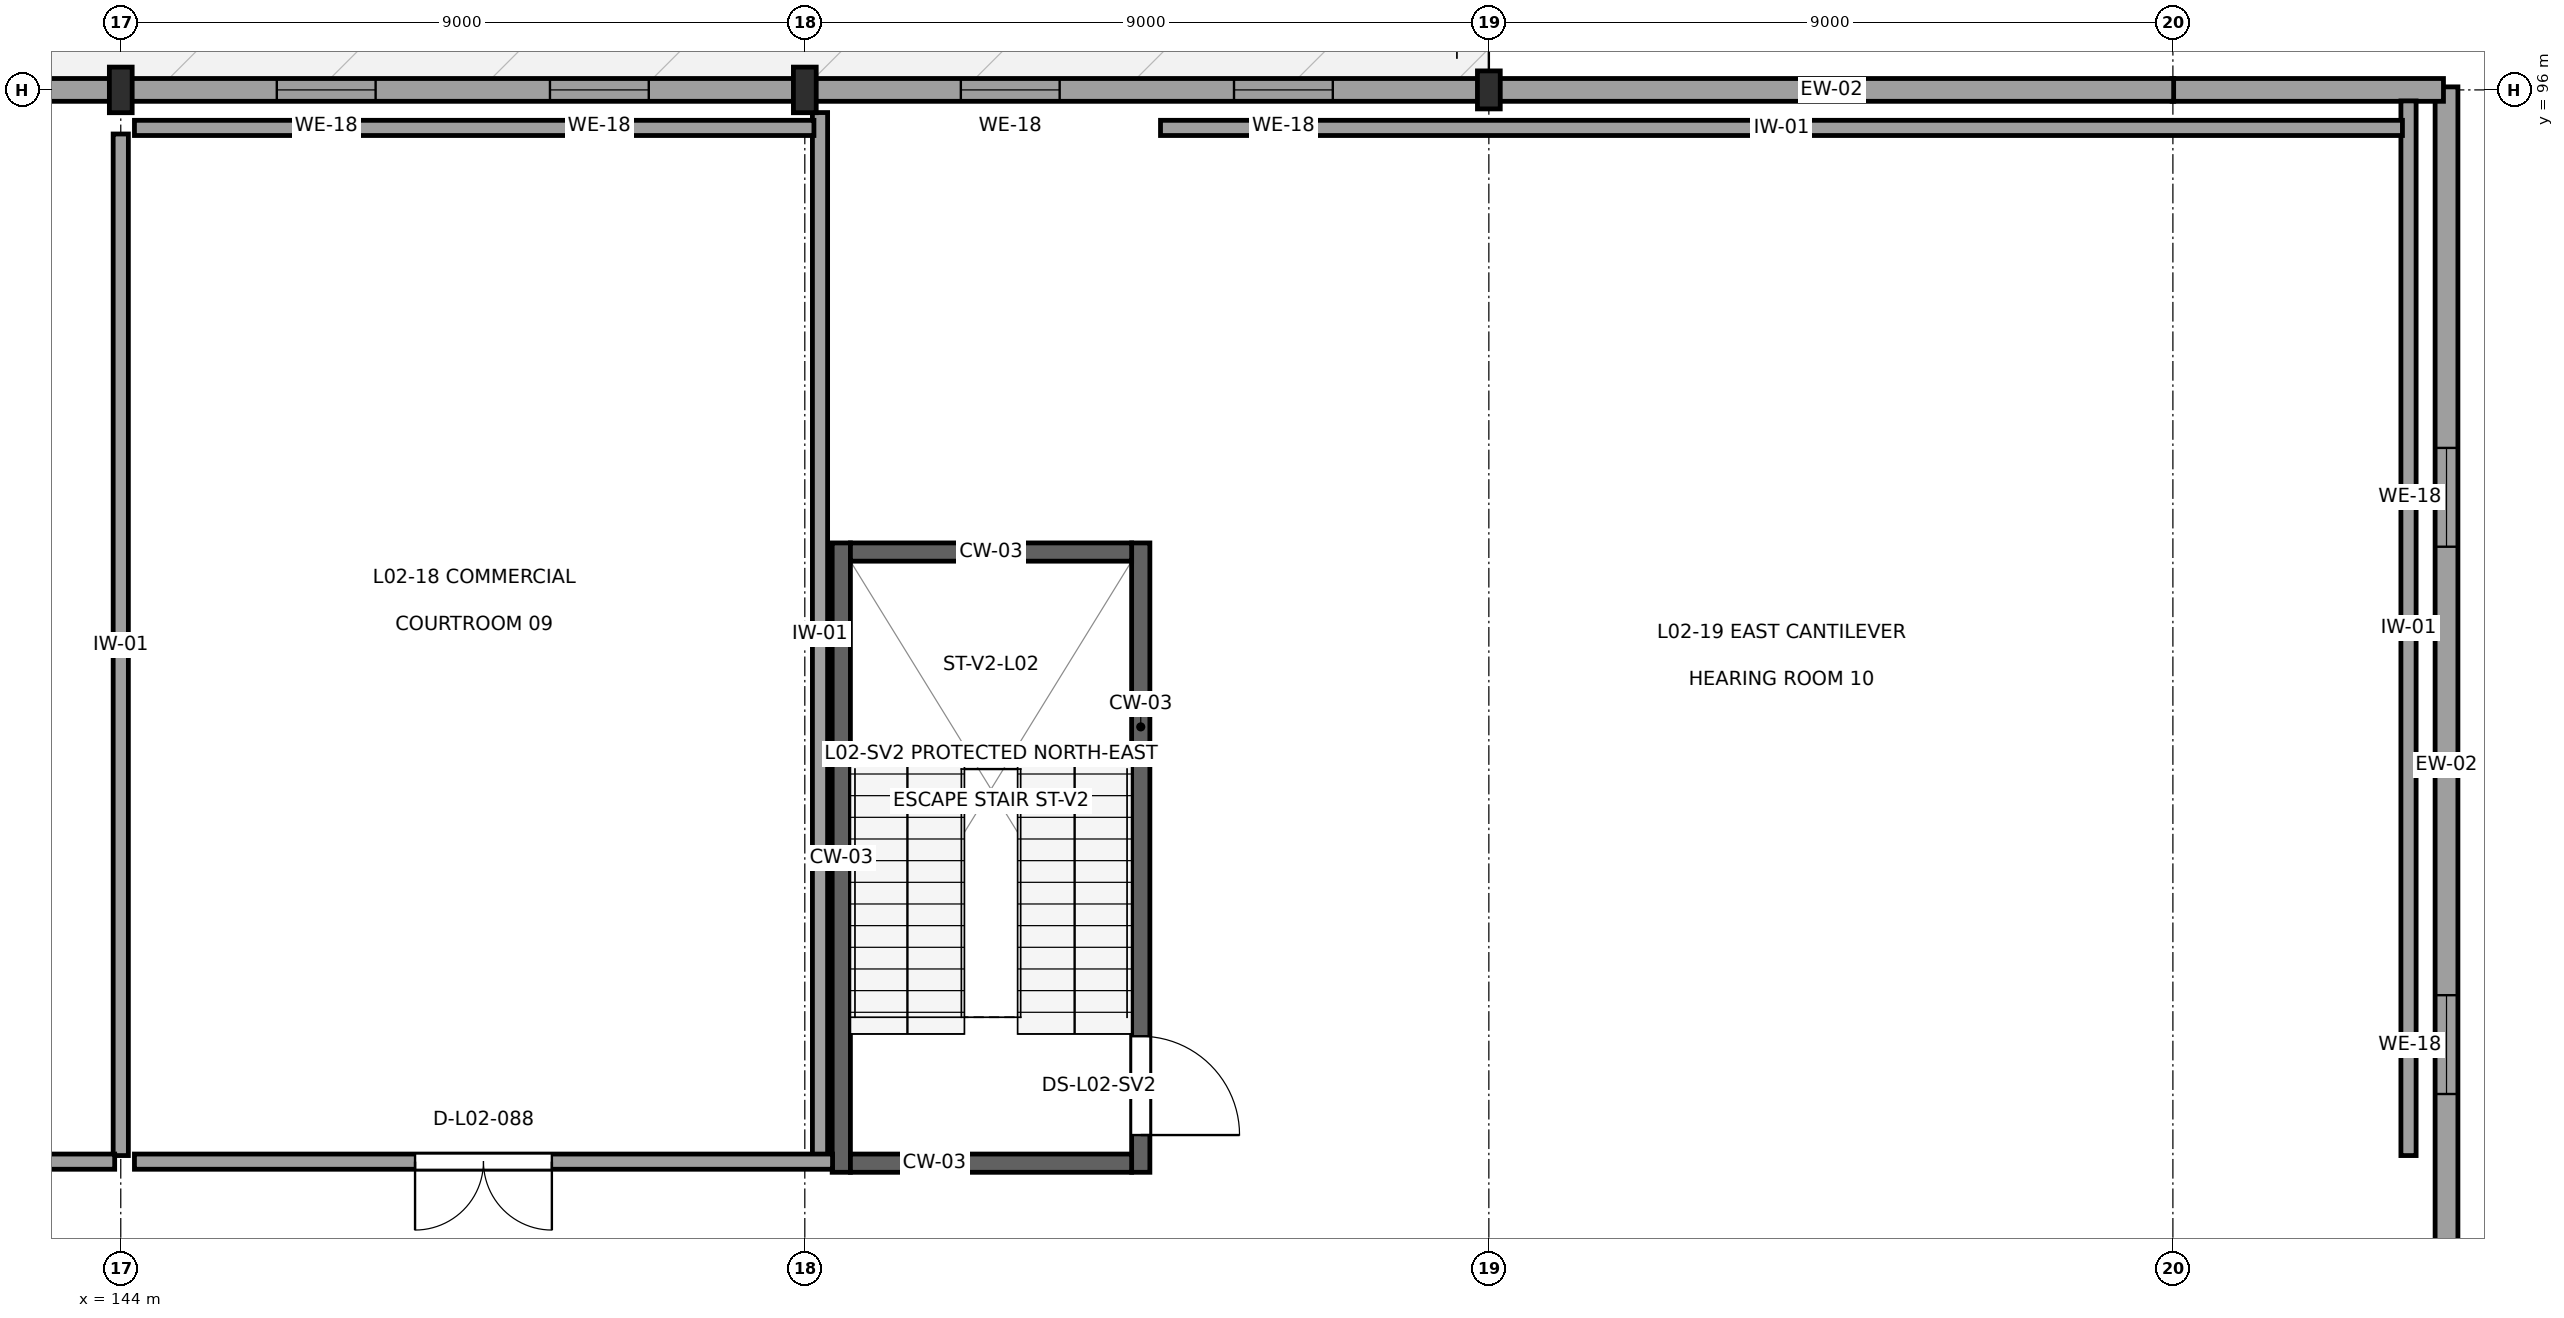
"""IFC4 building model, lengths in metres.
Left out: names, types, materials, properties, quantities, classifications, styles, units other than length and angle.
Written with IfcOpenShell. Run it as: python <this file> out.ifc"""

import sys

from ifc_helpers import new_model, si_unit, direction, frame, frame_2d, origin, origin_2d, place, context, subcontext, project, spatial, rectangle, i_section, extrude, element, fill, save


model = new_model("IFC4")
c1 = context("Model", 3, precision=1e-05, world=origin(), true_north=direction((0.0, 1.0)))
c2 = subcontext(c1, "Body", "Model", "MODEL_VIEW")
j1 = project(units=[si_unit("LENGTHUNIT", "METRE"), si_unit("PLANEANGLEUNIT", "RADIAN")], contexts=[c1])
p1 = place(None, origin())
s1 = spatial("IfcSite", under=j1, at=p1, CompositionType="ELEMENT")
p2 = place(p1, origin())
s2 = spatial("IfcBuilding", under=s1, at=p2, CompositionType="ELEMENT")
p3 = place(p2, frame((0.0, 0.0, 9.9)))
s3 = spatial("IfcBuildingStorey", under=s2, at=p3, CompositionType="ELEMENT", Elevation=9.9)
for number, where, z_axis, x_axis in (
    (1, (144.0, 96.0, 0.0), (0.0, 0.0, 1.0), (1.0, 0.0, 0.0)),
    (2, (153.0, 96.0, 0.0), (0.0, 0.0, 1.0), (1.0, 0.0, 0.0)),
):
    element("IfcColumn", number, at=place(p3, frame(where, z_axis=z_axis, x_axis=x_axis)), inside=s3, PredefinedType="COLUMN", context=c2, shape_type="SweptSolid", body=[
        extrude(i_section(OverallWidth=0.3, OverallDepth=0.6, WebThickness=0.015, FlangeThickness=0.03, at=origin_2d()), origin(), (0.0, 0.0, 1.0), 4.5),
    ])
p4 = place(p3, frame((162.0, 96.0, 0.0), z_axis=(0.0, 0.0, 1.0), x_axis=(1.0, 0.0, 0.0)))
e3 = element("IfcColumn", 3, at=p4, inside=s3, PredefinedType="COLUMN", context=c2, shape_type="SweptSolid", body=[
    extrude(i_section(OverallWidth=0.3, OverallDepth=0.5, WebThickness=0.014, FlangeThickness=0.028, at=origin_2d()), origin(), (0.0, 0.0, 1.0), 4.5),
])
p5 = place(p3, frame((174.6, 78.04, 0.0), z_axis=(0.0, 0.0, 1.0), x_axis=(0.0, 1.0, 0.0)))
e4 = element("IfcWall", 4, at=p5, inside=s3, PredefinedType="SOLIDWALL", context=c2, shape_type="SweptSolid", body=[
    extrude(rectangle(XDim=18.0, YDim=0.3, at=frame_2d((9.0, 0.0))), origin(), (0.0, 0.0, 1.0), 3.545),
])
p6 = place(p5, frame((4.75, 0.0, 0.9)))
e5 = element("IfcOpeningElement", 5, at=p6, cuts=e4, PredefinedType="OPENING", context=c2, shape_type="SweptSolid", body=[
    extrude(rectangle(XDim=1.3, YDim=1.3, at=frame_2d((0.65, 0.65))), frame((0.0, 0.165, 0.0), z_axis=(0.0, -1.0, 0.0), x_axis=(1.0, 0.0, 0.0)), (0.0, 0.0, 1.0), 0.33),
])
p7 = place(p5, frame((11.95, 0.0, 0.9)))
e6 = element("IfcOpeningElement", 6, at=p7, cuts=e4, PredefinedType="OPENING", context=c2, shape_type="SweptSolid", body=[
    extrude(rectangle(XDim=1.3, YDim=1.3, at=frame_2d((0.65, 0.65))), frame((0.0, 0.165, 0.0), z_axis=(0.0, -1.0, 0.0), x_axis=(1.0, 0.0, 0.0)), (0.0, 0.0, 1.0), 0.33),
])
p8 = place(p3, frame((174.56, 96.0, 0.0), z_axis=(0.0, 0.0, 1.0), x_axis=(-1.0, 0.0, 0.0)))
e7 = element("IfcWall", 7, at=p8, inside=s3, PredefinedType="SOLIDWALL", context=c2, shape_type="SweptSolid", body=[
    extrude(rectangle(XDim=3.57, YDim=0.3, at=frame_2d((1.785, 0.0))), origin(), (0.0, 0.0, 1.0), 3.187),
])
p9 = place(p3, frame((171.01, 96.0, 0.0), z_axis=(0.0, 0.0, 1.0), x_axis=(-1.0, 0.0, 0.0)))
e8 = element("IfcWall", 8, at=p9, inside=s3, PredefinedType="SOLIDWALL", context=c2, shape_type="SweptSolid", body=[
    extrude(rectangle(XDim=9.002, YDim=0.3, at=frame_2d((4.501, 0.0))), origin(), (0.0, 0.0, 1.0), 3.187),
])
p10 = place(p3, frame((161.992, 96.0, 0.0), z_axis=(0.0, 0.0, 1.0), x_axis=(-1.0, 0.0, 0.0)))
e9 = element("IfcWall", 9, at=p10, inside=s3, PredefinedType="SOLIDWALL", context=c2, shape_type="SweptSolid", body=[
    extrude(rectangle(XDim=8.984, YDim=0.3, at=frame_2d((4.492, 0.0))), origin(), (0.0, 0.0, 1.0), 3.187),
])
p11 = place(p10, frame((2.045, 0.0, 0.9)))
e10 = element("IfcOpeningElement", 10, at=p11, cuts=e9, PredefinedType="OPENING", context=c2, shape_type="SweptSolid", body=[
    extrude(rectangle(XDim=1.3, YDim=1.3, at=frame_2d((0.65, 0.65))), frame((0.0, 0.165, 0.0), z_axis=(0.0, -1.0, 0.0), x_axis=(1.0, 0.0, 0.0)), (0.0, 0.0, 1.0), 0.33),
])
p12 = place(p10, frame((5.639, 0.0, 0.9)))
e11 = element("IfcOpeningElement", 11, at=p12, cuts=e9, PredefinedType="OPENING", context=c2, shape_type="SweptSolid", body=[
    extrude(rectangle(XDim=1.3, YDim=1.3, at=frame_2d((0.65, 0.65))), frame((0.0, 0.165, 0.0), z_axis=(0.0, -1.0, 0.0), x_axis=(1.0, 0.0, 0.0)), (0.0, 0.0, 1.0), 0.33),
])
p13 = place(p3, frame((152.992, 96.0, 0.0), z_axis=(0.0, 0.0, 1.0), x_axis=(-1.0, 0.0, 0.0)))
e12 = element("IfcWall", 12, at=p13, inside=s3, PredefinedType="SOLIDWALL", context=c2, shape_type="SweptSolid", body=[
    extrude(rectangle(XDim=8.984, YDim=0.3, at=frame_2d((4.492, 0.0))), origin(), (0.0, 0.0, 1.0), 3.187),
])
p14 = place(p13, frame((2.045, 0.0, 0.9)))
e13 = element("IfcOpeningElement", 13, at=p14, cuts=e12, PredefinedType="OPENING", context=c2, shape_type="SweptSolid", body=[
    extrude(rectangle(XDim=1.3, YDim=1.3, at=frame_2d((0.65, 0.65))), frame((0.0, 0.165, 0.0), z_axis=(0.0, -1.0, 0.0), x_axis=(1.0, 0.0, 0.0)), (0.0, 0.0, 1.0), 0.33),
])
p15 = place(p13, frame((5.639, 0.0, 0.9)))
e14 = element("IfcOpeningElement", 14, at=p15, cuts=e12, PredefinedType="OPENING", context=c2, shape_type="SweptSolid", body=[
    extrude(rectangle(XDim=1.3, YDim=1.3, at=frame_2d((0.65, 0.65))), frame((0.0, 0.165, 0.0), z_axis=(0.0, -1.0, 0.0), x_axis=(1.0, 0.0, 0.0)), (0.0, 0.0, 1.0), 0.33),
])
p16 = place(p3, frame((143.992, 96.0, 0.0), z_axis=(0.0, 0.0, 1.0), x_axis=(-1.0, 0.0, 0.0)))
e15 = element("IfcWall", 15, at=p16, inside=s3, PredefinedType="SOLIDWALL", context=c2, shape_type="SweptSolid", body=[
    extrude(rectangle(XDim=8.984, YDim=0.3, at=frame_2d((4.492, 0.0))), origin(), (0.0, 0.0, 1.0), 3.187),
])
p17 = place(p16, frame((2.045, 0.0, 0.9)))
e16 = element("IfcOpeningElement", 16, at=p17, cuts=e15, PredefinedType="OPENING", context=c2, shape_type="SweptSolid", body=[
    extrude(rectangle(XDim=1.3, YDim=1.3, at=frame_2d((0.65, 0.65))), frame((0.0, 0.165, 0.0), z_axis=(0.0, -1.0, 0.0), x_axis=(1.0, 0.0, 0.0)), (0.0, 0.0, 1.0), 0.33),
])
p18 = place(p16, frame((5.639, 0.0, 0.9)))
e17 = element("IfcOpeningElement", 17, at=p18, cuts=e15, PredefinedType="OPENING", context=c2, shape_type="SweptSolid", body=[
    extrude(rectangle(XDim=1.3, YDim=1.3, at=frame_2d((0.65, 0.65))), frame((0.0, 0.165, 0.0), z_axis=(0.0, -1.0, 0.0), x_axis=(1.0, 0.0, 0.0)), (0.0, 0.0, 1.0), 0.33),
])
p19 = place(p3, frame((153.48, 81.76, 0.0), z_axis=(0.0, 0.0, 1.0), x_axis=(0.0, 1.0, 0.0)))
e18 = element("IfcWall", 18, at=p19, inside=s3, PredefinedType="SHEAR", context=c2, shape_type="SweptSolid", body=[
    extrude(rectangle(XDim=8.28, YDim=0.24, at=frame_2d((4.14, 0.0))), origin(), (0.0, 0.0, 1.0), 4.31),
])
p20 = place(p3, frame((157.42, 81.76, 0.0), z_axis=(0.0, 0.0, 1.0), x_axis=(0.0, 1.0, 0.0)))
e19 = element("IfcWall", 19, at=p20, inside=s3, PredefinedType="SHEAR", context=c2, shape_type="SweptSolid", body=[
    extrude(rectangle(XDim=8.28, YDim=0.24, at=frame_2d((4.14, 0.0))), origin(), (0.0, 0.0, 1.0), 4.31),
])
p21 = place(p20, frame((0.49, 0.0, 0.0)))
e20 = element("IfcOpeningElement", 20, at=p21, cuts=e19, PredefinedType="OPENING", context=c2, shape_type="SweptSolid", body=[
    extrude(rectangle(XDim=1.3, YDim=2.2, at=frame_2d((0.65, 1.1))), frame((0.0, 0.135, 0.0), z_axis=(0.0, -1.0, 0.0), x_axis=(1.0, 0.0, 0.0)), (0.0, 0.0, 1.0), 0.27),
])
for number, where, z_axis, x_axis in (
    (21, (153.6, 81.88, 0.0), (0.0, 0.0, 1.0), (1.0, 0.0, 0.0)),
    (22, (153.6, 89.92, 0.0), (0.0, 0.0, 1.0), (1.0, 0.0, 0.0)),
):
    element("IfcWall", number, at=place(p3, frame(where, z_axis=z_axis, x_axis=x_axis)), inside=s3, PredefinedType="SHEAR", context=c2, shape_type="SweptSolid", body=[
        extrude(rectangle(XDim=3.7, YDim=0.24, at=frame_2d((1.85, 0.0))), origin(), (0.0, 0.0, 1.0), 4.31),
    ])
p22 = place(p3, frame((144.0, 95.42, 0.0), z_axis=(0.0, 0.0, 1.0), x_axis=(0.0, -1.0, 0.0)))
e23 = element("IfcWall", 23, at=p22, inside=s3, PredefinedType="PARTITIONING", context=c2, shape_type="SweptSolid", body=[
    extrude(rectangle(XDim=13.44, YDim=0.2, at=frame_2d((6.72, 0.0))), origin(), (0.0, 0.0, 1.0), 3.395),
])
p23 = place(p3, frame((143.92, 81.9, 0.0), z_axis=(0.0, 0.0, 1.0), x_axis=(-1.0, 0.0, 0.0)))
e24 = element("IfcWall", 24, at=p23, inside=s3, PredefinedType="PARTITIONING", context=c2, shape_type="SweptSolid", body=[
    extrude(rectangle(XDim=17.64, YDim=0.2, at=frame_2d((8.82, 0.0))), origin(), (0.0, 0.0, 1.0), 4.14),
])
p24 = place(p23, frame((7.87, 0.0, 0.0)))
e25 = element("IfcOpeningElement", 25, at=p24, cuts=e24, PredefinedType="OPENING", context=c2, shape_type="SweptSolid", body=[
    extrude(rectangle(XDim=1.9, YDim=2.5, at=frame_2d((0.95, 1.25))), frame((0.0, 0.115, 0.0), z_axis=(0.0, -1.0, 0.0), x_axis=(1.0, 0.0, 0.0)), (0.0, 0.0, 1.0), 0.23),
])
p25 = place(p3, frame((153.2, 95.702, 0.0), z_axis=(0.0, 0.0, 1.0), x_axis=(0.0, -1.0, 0.0)))
e26 = element("IfcWall", 26, at=p25, inside=s3, PredefinedType="PARTITIONING", context=c2, shape_type="SweptSolid", body=[
    extrude(rectangle(XDim=13.722, YDim=0.2, at=frame_2d((6.861, 0.0))), origin(), (0.0, 0.0, 1.0), 3.545),
])
p26 = place(p3, frame((153.365, 81.9, 0.0), z_axis=(0.0, 0.0, 1.0), x_axis=(-1.0, 0.0, 0.0)))
e27 = element("IfcWall", 27, at=p26, inside=s3, PredefinedType="PARTITIONING", context=c2, shape_type="SweptSolid", body=[
    extrude(rectangle(XDim=9.185, YDim=0.2, at=frame_2d((4.593, 0.0))), origin(), (0.0, 0.0, 1.0), 4.14),
])
p27 = place(p26, frame((3.693, 0.0, 0.0)))
e28 = element("IfcOpeningElement", 28, at=p27, cuts=e27, PredefinedType="OPENING", context=c2, shape_type="SweptSolid", body=[
    extrude(rectangle(XDim=1.8, YDim=2.45, at=frame_2d((0.9, 1.225))), frame((0.0, 0.115, 0.0), z_axis=(0.0, -1.0, 0.0), x_axis=(1.0, 0.0, 0.0)), (0.0, 0.0, 1.0), 0.23),
])
p28 = place(p3, frame((144.18, 95.5, 0.0), z_axis=(0.0, 0.0, 1.0), x_axis=(1.0, 0.0, 0.0)))
e29 = element("IfcWall", 29, at=p28, inside=s3, PredefinedType="PARTITIONING", context=c2, shape_type="SweptSolid", body=[
    extrude(rectangle(XDim=8.94, YDim=0.2, at=frame_2d((4.47, 0.0))), origin(), (0.0, 0.0, 1.0), 4.14),
])
p29 = place(p3, frame((174.1, 95.855, 0.0), z_axis=(0.0, 0.0, 1.0), x_axis=(0.0, -1.0, 0.0)))
e30 = element("IfcWall", 30, at=p29, inside=s3, PredefinedType="PARTITIONING", context=c2, shape_type="SweptSolid", body=[
    extrude(rectangle(XDim=13.875, YDim=0.2, at=frame_2d((6.938, 0.0))), origin(), (0.0, 0.0, 1.0), 4.14),
])
p30 = place(p3, frame((157.68, 95.5, 0.0), z_axis=(0.0, 0.0, 1.0), x_axis=(1.0, 0.0, 0.0)))
e31 = element("IfcWall", 31, at=p30, inside=s3, PredefinedType="PARTITIONING", context=c2, shape_type="SweptSolid", body=[
    extrude(rectangle(XDim=16.34, YDim=0.2, at=frame_2d((8.17, 0.0))), origin(), (0.0, 0.0, 1.0), 4.14),
])
p31 = place(p6, origin())
e32 = element("IfcWindow", 32, at=p31, inside=s3, PartitioningType="SINGLE_PANEL", PredefinedType="WINDOW", context=c2, shape_type="SweptSolid", body=[
    extrude(rectangle(XDim=1.3, YDim=1.3, at=frame_2d((0.65, 0.65))), frame((0.0, 0.03, 0.0), z_axis=(0.0, -1.0, 0.0), x_axis=(1.0, 0.0, 0.0)), (0.0, 0.0, 1.0), 0.06),
])
fill(e5, e32)
p32 = place(p7, origin())
e33 = element("IfcWindow", 33, at=p32, inside=s3, PartitioningType="SINGLE_PANEL", PredefinedType="WINDOW", context=c2, shape_type="SweptSolid", body=[
    extrude(rectangle(XDim=1.3, YDim=1.3, at=frame_2d((0.65, 0.65))), frame((0.0, 0.03, 0.0), z_axis=(0.0, -1.0, 0.0), x_axis=(1.0, 0.0, 0.0)), (0.0, 0.0, 1.0), 0.06),
])
fill(e6, e33)
p33 = place(p11, origin())
e34 = element("IfcWindow", 34, at=p33, inside=s3, PartitioningType="SINGLE_PANEL", PredefinedType="WINDOW", context=c2, shape_type="SweptSolid", body=[
    extrude(rectangle(XDim=1.3, YDim=1.3, at=frame_2d((0.65, 0.65))), frame((0.0, 0.03, 0.0), z_axis=(0.0, -1.0, 0.0), x_axis=(1.0, 0.0, 0.0)), (0.0, 0.0, 1.0), 0.06),
])
fill(e10, e34)
p34 = place(p12, origin())
e35 = element("IfcWindow", 35, at=p34, inside=s3, PartitioningType="SINGLE_PANEL", PredefinedType="WINDOW", context=c2, shape_type="SweptSolid", body=[
    extrude(rectangle(XDim=1.3, YDim=1.3, at=frame_2d((0.65, 0.65))), frame((0.0, 0.03, 0.0), z_axis=(0.0, -1.0, 0.0), x_axis=(1.0, 0.0, 0.0)), (0.0, 0.0, 1.0), 0.06),
])
fill(e11, e35)
p35 = place(p14, origin())
e36 = element("IfcWindow", 36, at=p35, inside=s3, PartitioningType="SINGLE_PANEL", PredefinedType="WINDOW", context=c2, shape_type="SweptSolid", body=[
    extrude(rectangle(XDim=1.3, YDim=1.3, at=frame_2d((0.65, 0.65))), frame((0.0, 0.03, 0.0), z_axis=(0.0, -1.0, 0.0), x_axis=(1.0, 0.0, 0.0)), (0.0, 0.0, 1.0), 0.06),
])
fill(e13, e36)
p36 = place(p15, origin())
e37 = element("IfcWindow", 37, at=p36, inside=s3, PartitioningType="SINGLE_PANEL", PredefinedType="WINDOW", context=c2, shape_type="SweptSolid", body=[
    extrude(rectangle(XDim=1.3, YDim=1.3, at=frame_2d((0.65, 0.65))), frame((0.0, 0.03, 0.0), z_axis=(0.0, -1.0, 0.0), x_axis=(1.0, 0.0, 0.0)), (0.0, 0.0, 1.0), 0.06),
])
fill(e14, e37)
p37 = place(p21, frame((1.3, 0.0, 0.0), z_axis=(0.0, 0.0, 1.0), x_axis=(-1.0, 0.0, 0.0)))
e38 = element("IfcDoor", 38, at=p37, inside=s3, OperationType="SINGLE_SWING_LEFT", PredefinedType="DOOR", context=c2, shape_type="SweptSolid", body=[
    extrude(rectangle(XDim=1.3, YDim=2.2, at=frame_2d((0.65, 1.1))), frame((0.0, 0.025, 0.0), z_axis=(0.0, -1.0, 0.0), x_axis=(1.0, 0.0, 0.0)), (0.0, 0.0, 1.0), 0.05),
])
fill(e20, e38)
p38 = place(p27, origin())
e39 = element("IfcDoor", 39, at=p38, inside=s3, OperationType="DOUBLE_DOOR_SINGLE_SWING", PredefinedType="DOOR", context=c2, shape_type="SweptSolid", body=[
    extrude(rectangle(XDim=1.8, YDim=2.45, at=frame_2d((0.9, 1.225))), frame((0.0, 0.025, 0.0), z_axis=(0.0, -1.0, 0.0), x_axis=(1.0, 0.0, 0.0)), (0.0, 0.0, 1.0), 0.05),
])
fill(e28, e39)
save(model, sys.argv[1])
